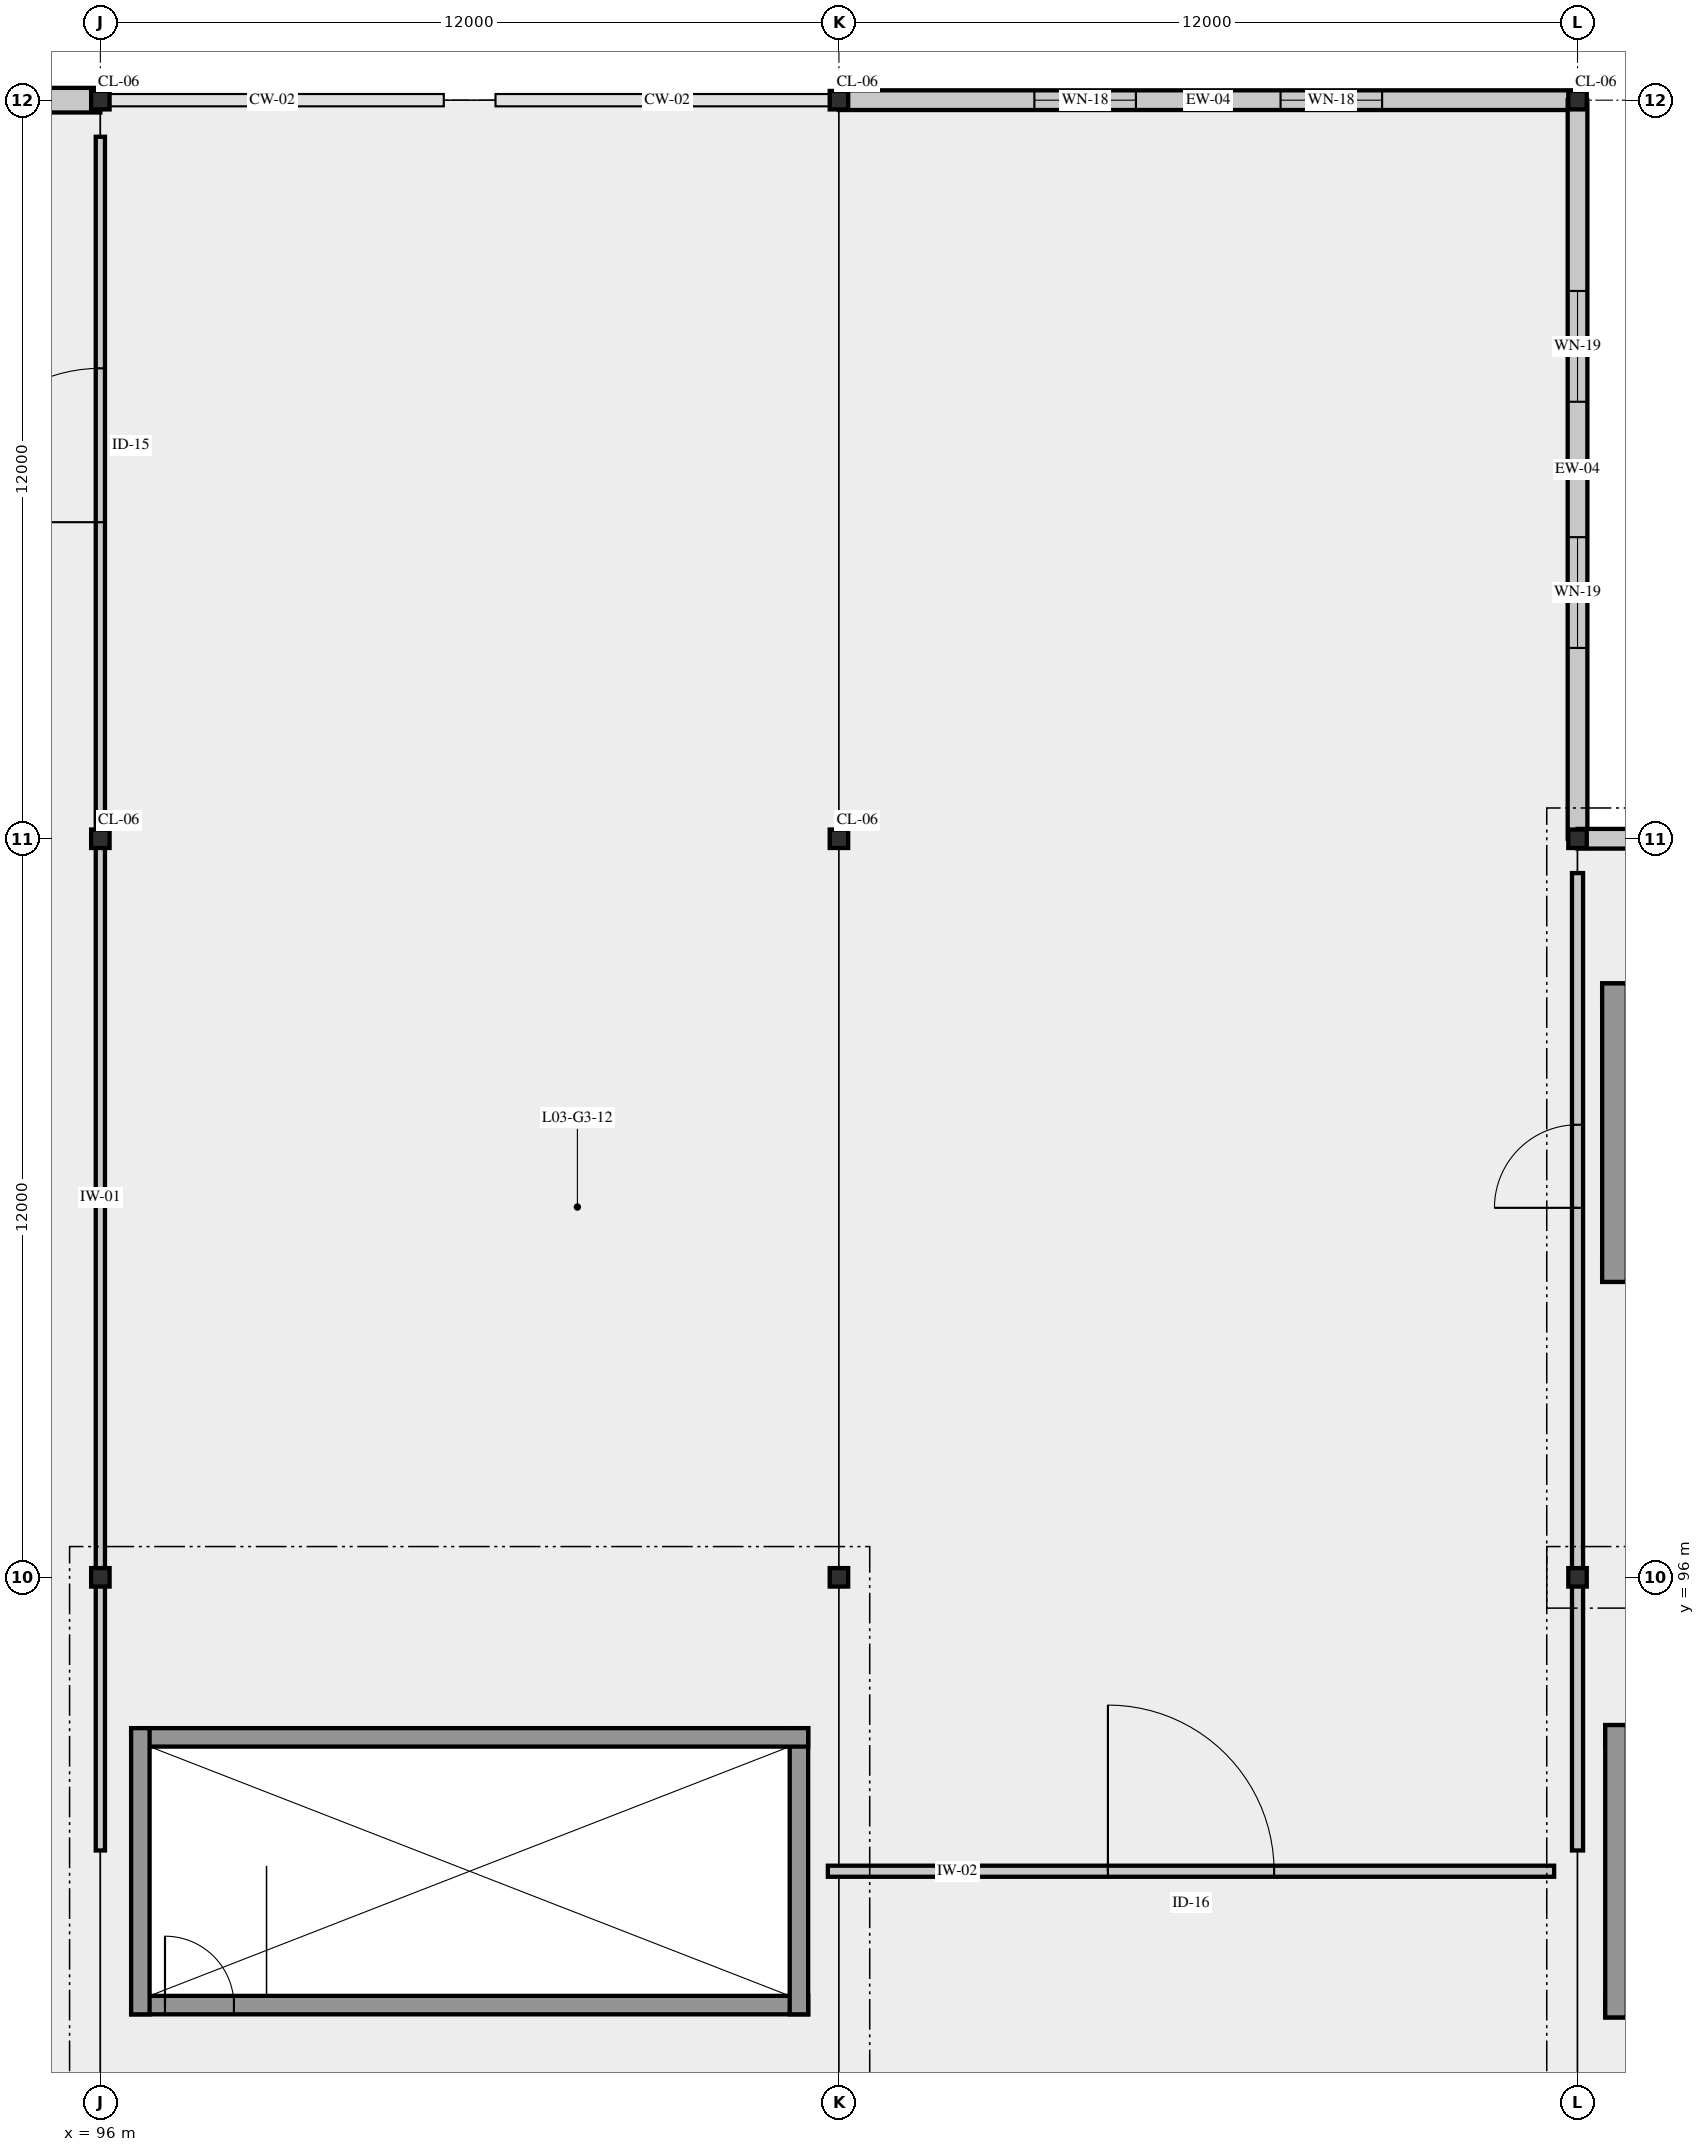
"""IFC4 building model, lengths in metres.
Left out: names, types, materials, properties, quantities, classifications, styles, units other than length and angle.
Written with IfcOpenShell. Run it as: python <this file> out.ifc"""

import sys

from ifc_helpers import new_model, si_unit, direction, frame, frame_2d, origin, origin_2d, place, context, subcontext, project, spatial, rectangle, i_section, extrude, element, fill, save


model = new_model("IFC4")
c1 = context("Model", 3, precision=1e-05, world=origin(), true_north=direction((0.0, 1.0)))
c2 = subcontext(c1, "Body", "Model", "MODEL_VIEW")
j1 = project(units=[si_unit("LENGTHUNIT", "METRE"), si_unit("PLANEANGLEUNIT", "RADIAN")], contexts=[c1])
p1 = place(None, origin())
s1 = spatial("IfcSite", under=j1, at=p1, CompositionType="ELEMENT")
p2 = place(p1, origin())
s2 = spatial("IfcBuilding", under=s1, at=p2, CompositionType="ELEMENT")
p3 = place(p2, frame((0.0, 0.0, 16.8)))
s3 = spatial("IfcBuildingStorey", under=s2, at=p3, CompositionType="ELEMENT", Elevation=16.8)
for number, where, z_axis, x_axis in (
    (1, (96.0, 96.0, 0.0), (0.0, 0.0, 1.0), (1.0, 0.0, 0.0)),
    (2, (96.0, 108.0, 0.0), (0.0, 0.0, 1.0), (1.0, 0.0, 0.0)),
    (3, (96.0, 120.0, 0.0), (0.0, 0.0, 1.0), (1.0, 0.0, 0.0)),
    (4, (108.0, 96.0, 0.0), (0.0, 0.0, 1.0), (1.0, 0.0, 0.0)),
    (5, (108.0, 108.0, 0.0), (0.0, 0.0, 1.0), (1.0, 0.0, 0.0)),
    (6, (108.0, 120.0, 0.0), (0.0, 0.0, 1.0), (1.0, 0.0, 0.0)),
    (7, (120.0, 96.0, 0.0), (0.0, 0.0, 1.0), (1.0, 0.0, 0.0)),
    (8, (120.0, 108.0, 0.0), (0.0, 0.0, 1.0), (1.0, 0.0, 0.0)),
    (9, (120.0, 120.0, 0.0), (0.0, 0.0, 1.0), (1.0, 0.0, 0.0)),
):
    element("IfcColumn", number, at=place(p3, frame(where, z_axis=z_axis, x_axis=x_axis)), inside=s3, PredefinedType="COLUMN", context=c2, shape_type="SweptSolid", body=[
        extrude(i_section(OverallWidth=0.3, OverallDepth=0.3, WebThickness=0.011, FlangeThickness=0.019, FilletRadius=0.027, at=origin_2d()), origin(), (0.0, 0.0, 1.0), 6.6),
    ])
p4 = place(p3, frame((96.0, 120.0, 0.0), z_axis=(0.0, 0.0, 1.0), x_axis=(-1.0, 0.0, 0.0)))
e10 = element("IfcWall", 10, at=p4, inside=s3, PredefinedType="SOLIDWALL", context=c2, shape_type="SweptSolid", body=[
    extrude(rectangle(XDim=12.0, YDim=0.4, at=frame_2d((6.0, 0.0))), origin(), (0.0, 0.0, 1.0), 5.75),
])
p5 = place(p4, frame((3.325, 0.0, 0.95)))
e11 = element("IfcOpeningElement", 11, at=p5, cuts=e10, PredefinedType="OPENING", context=c2, shape_type="SweptSolid", body=[
    extrude(rectangle(XDim=1.35, YDim=1.8, at=frame_2d((0.675, 0.9))), frame((0.0, 0.21, 0.0), z_axis=(0.0, -1.0, 0.0), x_axis=(1.0, 0.0, 0.0)), (0.0, 0.0, 1.0), 0.42),
])
p6 = place(p4, frame((7.325, 0.0, 0.95)))
e12 = element("IfcOpeningElement", 12, at=p6, cuts=e10, PredefinedType="OPENING", context=c2, shape_type="SweptSolid", body=[
    extrude(rectangle(XDim=1.35, YDim=1.8, at=frame_2d((0.675, 0.9))), frame((0.0, 0.21, 0.0), z_axis=(0.0, -1.0, 0.0), x_axis=(1.0, 0.0, 0.0)), (0.0, 0.0, 1.0), 0.42),
])
p7 = place(p3, frame((120.0, 120.0, 0.0), z_axis=(0.0, 0.0, 1.0), x_axis=(-1.0, 0.0, 0.0)))
e13 = element("IfcWall", 13, at=p7, inside=s3, PredefinedType="SOLIDWALL", context=c2, shape_type="SweptSolid", body=[
    extrude(rectangle(XDim=12.0, YDim=0.32, at=frame_2d((6.0, 0.0))), origin(), (0.0, 0.0, 1.0), 5.75),
])
p8 = place(p7, frame((3.175, 0.0, 0.95)))
e14 = element("IfcOpeningElement", 14, at=p8, cuts=e13, PredefinedType="OPENING", context=c2, shape_type="SweptSolid", body=[
    extrude(rectangle(XDim=1.65, YDim=1.8, at=frame_2d((0.825, 0.9))), frame((0.0, 0.17, 0.0), z_axis=(0.0, -1.0, 0.0), x_axis=(1.0, 0.0, 0.0)), (0.0, 0.0, 1.0), 0.34),
])
p9 = place(p7, frame((7.175, 0.0, 0.95)))
e15 = element("IfcOpeningElement", 15, at=p9, cuts=e13, PredefinedType="OPENING", context=c2, shape_type="SweptSolid", body=[
    extrude(rectangle(XDim=1.65, YDim=1.8, at=frame_2d((0.825, 0.9))), frame((0.0, 0.17, 0.0), z_axis=(0.0, -1.0, 0.0), x_axis=(1.0, 0.0, 0.0)), (0.0, 0.0, 1.0), 0.34),
])
p10 = place(p3, frame((120.0, 108.0, 0.0), z_axis=(0.0, 0.0, 1.0), x_axis=(0.0, 1.0, 0.0)))
e16 = element("IfcWall", 16, at=p10, inside=s3, PredefinedType="SOLIDWALL", context=c2, shape_type="SweptSolid", body=[
    extrude(rectangle(XDim=12.0, YDim=0.32, at=frame_2d((6.0, 0.0))), origin(), (0.0, 0.0, 1.0), 5.75),
])
p11 = place(p10, frame((3.1, 0.0, 0.95)))
e17 = element("IfcOpeningElement", 17, at=p11, cuts=e16, PredefinedType="OPENING", context=c2, shape_type="SweptSolid", body=[
    extrude(rectangle(XDim=1.8, YDim=1.8, at=frame_2d((0.9, 0.9))), frame((0.0, 0.17, 0.0), z_axis=(0.0, -1.0, 0.0), x_axis=(1.0, 0.0, 0.0)), (0.0, 0.0, 1.0), 0.34),
])
p12 = place(p10, frame((7.1, 0.0, 0.95)))
e18 = element("IfcOpeningElement", 18, at=p12, cuts=e16, PredefinedType="OPENING", context=c2, shape_type="SweptSolid", body=[
    extrude(rectangle(XDim=1.8, YDim=1.8, at=frame_2d((0.9, 0.9))), frame((0.0, 0.17, 0.0), z_axis=(0.0, -1.0, 0.0), x_axis=(1.0, 0.0, 0.0)), (0.0, 0.0, 1.0), 0.34),
])
p13 = place(p3, frame((132.0, 108.0, 0.0), z_axis=(0.0, 0.0, 1.0), x_axis=(-1.0, 0.0, 0.0)))
e19 = element("IfcWall", 19, at=p13, inside=s3, PredefinedType="SOLIDWALL", context=c2, shape_type="SweptSolid", body=[
    extrude(rectangle(XDim=12.0, YDim=0.32, at=frame_2d((6.0, 0.0))), origin(), (0.0, 0.0, 1.0), 5.75),
])
p14 = place(p13, frame((4.35, 0.0, 0.95)))
e20 = element("IfcOpeningElement", 20, at=p14, cuts=e19, PredefinedType="OPENING", context=c2, shape_type="SweptSolid", body=[
    extrude(rectangle(XDim=3.3, YDim=1.8, at=frame_2d((1.65, 0.9))), frame((0.0, 0.17, 0.0), z_axis=(0.0, -1.0, 0.0), x_axis=(1.0, 0.0, 0.0)), (0.0, 0.0, 1.0), 0.34),
])
p15 = place(p3, frame((96.5, 89.05, 0.0), z_axis=(0.0, 0.0, 1.0), x_axis=(1.0, 0.0, 0.0)))
e21 = element("IfcWall", 21, at=p15, inside=s3, PredefinedType="SHEAR", context=c2, shape_type="SweptSolid", body=[
    extrude(rectangle(XDim=11.0, YDim=0.3, at=frame_2d((5.5, 0.0))), origin(), (0.0, 0.0, 1.0), 6.35),
])
p16 = place(p15, frame((0.55, 0.0, 0.0)))
e22 = element("IfcOpeningElement", 22, at=p16, cuts=e21, PredefinedType="OPENING", context=c2, shape_type="SweptSolid", body=[
    extrude(rectangle(XDim=1.12, YDim=2.2, at=frame_2d((0.56, 1.1))), frame((0.0, 0.16, 0.0), z_axis=(0.0, -1.0, 0.0), x_axis=(1.0, 0.0, 0.0)), (0.0, 0.0, 1.0), 0.32),
])
p17 = place(p3, frame((107.35, 88.9, 0.0), z_axis=(0.0, 0.0, 1.0), x_axis=(0.0, 1.0, 0.0)))
e23 = element("IfcWall", 23, at=p17, inside=s3, PredefinedType="SHEAR", context=c2, shape_type="SweptSolid", body=[
    extrude(rectangle(XDim=4.65, YDim=0.3, at=frame_2d((2.325, 0.0))), origin(), (0.0, 0.0, 1.0), 6.35),
])
p18 = place(p3, frame((107.5, 93.4, 0.0), z_axis=(0.0, 0.0, 1.0), x_axis=(-1.0, 0.0, 0.0)))
e24 = element("IfcWall", 24, at=p18, inside=s3, PredefinedType="SHEAR", context=c2, shape_type="SweptSolid", body=[
    extrude(rectangle(XDim=11.0, YDim=0.3, at=frame_2d((5.5, 0.0))), origin(), (0.0, 0.0, 1.0), 6.35),
])
p19 = place(p3, frame((96.65, 93.55, 0.0), z_axis=(0.0, 0.0, 1.0), x_axis=(0.0, -1.0, 0.0)))
e25 = element("IfcWall", 25, at=p19, inside=s3, PredefinedType="SHEAR", context=c2, shape_type="SweptSolid", body=[
    extrude(rectangle(XDim=4.65, YDim=0.3, at=frame_2d((2.325, 0.0))), origin(), (0.0, 0.0, 1.0), 6.35),
])
p20 = place(p3, frame((120.45, 89.025, 0.0), z_axis=(0.0, 0.0, 1.0), x_axis=(1.0, 0.0, 0.0)))
e26 = element("IfcWall", 26, at=p20, inside=s3, PredefinedType="SHEAR", context=c2, shape_type="SweptSolid", body=[
    extrude(rectangle(XDim=11.1, YDim=0.35, at=frame_2d((5.55, 0.0))), origin(), (0.0, 0.0, 1.0), 6.35),
])
p21 = place(p20, frame((0.55, 0.0, 0.0)))
e27 = element("IfcOpeningElement", 27, at=p21, cuts=e26, PredefinedType="OPENING", context=c2, shape_type="SweptSolid", body=[
    extrude(rectangle(XDim=1.24, YDim=2.25, at=frame_2d((0.62, 1.125))), frame((0.0, 0.185, 0.0), z_axis=(0.0, -1.0, 0.0), x_axis=(1.0, 0.0, 0.0)), (0.0, 0.0, 1.0), 0.37),
])
p22 = place(p3, frame((131.55, 93.425, 0.0), z_axis=(0.0, 0.0, 1.0), x_axis=(-1.0, 0.0, 0.0)))
e28 = element("IfcWall", 28, at=p22, inside=s3, PredefinedType="SHEAR", context=c2, shape_type="SweptSolid", body=[
    extrude(rectangle(XDim=11.1, YDim=0.35, at=frame_2d((5.55, 0.0))), origin(), (0.0, 0.0, 1.0), 6.35),
])
p23 = place(p3, frame((120.625, 93.6, 0.0), z_axis=(0.0, 0.0, 1.0), x_axis=(0.0, -1.0, 0.0)))
e29 = element("IfcWall", 29, at=p23, inside=s3, PredefinedType="SHEAR", context=c2, shape_type="SweptSolid", body=[
    extrude(rectangle(XDim=4.75, YDim=0.35, at=frame_2d((2.375, 0.0))), origin(), (0.0, 0.0, 1.0), 6.35),
])
p24 = place(p3, frame((120.4, 101.0, 0.0), z_axis=(0.0, 0.0, 1.0), x_axis=(1.0, 0.0, 0.0)))
e30 = element("IfcWall", 30, at=p24, inside=s3, PredefinedType="SHEAR", context=c2, shape_type="SweptSolid", body=[
    extrude(rectangle(XDim=11.2, YDim=0.4, at=frame_2d((5.6, 0.0))), origin(), (0.0, 0.0, 1.0), 6.35),
])
p25 = place(p24, frame((0.55, 0.0, 0.0)))
e31 = element("IfcOpeningElement", 31, at=p25, cuts=e30, PredefinedType="OPENING", context=c2, shape_type="SweptSolid", body=[
    extrude(rectangle(XDim=1.48, YDim=2.3, at=frame_2d((0.74, 1.15))), frame((0.0, 0.21, 0.0), z_axis=(0.0, -1.0, 0.0), x_axis=(1.0, 0.0, 0.0)), (0.0, 0.0, 1.0), 0.42),
])
p26 = place(p3, frame((131.6, 105.45, 0.0), z_axis=(0.0, 0.0, 1.0), x_axis=(-1.0, 0.0, 0.0)))
e32 = element("IfcWall", 32, at=p26, inside=s3, PredefinedType="SHEAR", context=c2, shape_type="SweptSolid", body=[
    extrude(rectangle(XDim=11.2, YDim=0.4, at=frame_2d((5.6, 0.0))), origin(), (0.0, 0.0, 1.0), 6.35),
])
p27 = place(p3, frame((120.6, 105.65, 0.0), z_axis=(0.0, 0.0, 1.0), x_axis=(0.0, -1.0, 0.0)))
e33 = element("IfcWall", 33, at=p27, inside=s3, PredefinedType="SHEAR", context=c2, shape_type="SweptSolid", body=[
    extrude(rectangle(XDim=4.85, YDim=0.4, at=frame_2d((2.425, 0.0))), origin(), (0.0, 0.0, 1.0), 6.35),
])
p28 = place(p3, frame((96.0, 91.562, 0.0), z_axis=(0.0, 0.0, 1.0), x_axis=(0.0, 1.0, 0.0)))
e34 = element("IfcWall", 34, at=p28, inside=s3, PredefinedType="PARTITIONING", context=c2, shape_type="SweptSolid", body=[
    extrude(rectangle(XDim=27.843, YDim=0.15, at=frame_2d((13.921, 0.0))), origin(), (0.0, 0.0, 1.0), 5.82),
])
p29 = place(p28, frame((21.581, 0.0, 0.0)))
e35 = element("IfcOpeningElement", 35, at=p29, cuts=e34, PredefinedType="OPENING", context=c2, shape_type="SweptSolid", body=[
    extrude(rectangle(XDim=2.5, YDim=2.75, at=frame_2d((1.25, 1.375))), frame((0.0, 0.085, 0.0), z_axis=(0.0, -1.0, 0.0), x_axis=(1.0, 0.0, 0.0)), (0.0, 0.0, 1.0), 0.17),
])
p30 = place(p3, frame((107.82, 91.225, 0.0), z_axis=(0.0, 0.0, 1.0), x_axis=(1.0, 0.0, 0.0)))
e36 = element("IfcWall", 36, at=p30, inside=s3, PredefinedType="PARTITIONING", context=c2, shape_type="SweptSolid", body=[
    extrude(rectangle(XDim=11.8, YDim=0.18, at=frame_2d((5.9, 0.0))), origin(), (0.0, 0.0, 1.0), 5.82),
])
p31 = place(p30, frame((4.55, 0.0, 0.0)))
e37 = element("IfcOpeningElement", 37, at=p31, cuts=e36, PredefinedType="OPENING", context=c2, shape_type="SweptSolid", body=[
    extrude(rectangle(XDim=2.7, YDim=2.85, at=frame_2d((1.35, 1.425))), frame((0.0, 0.1, 0.0), z_axis=(0.0, -1.0, 0.0), x_axis=(1.0, 0.0, 0.0)), (0.0, 0.0, 1.0), 0.2),
])
p32 = place(p3, frame((120.0, 91.562, 0.0), z_axis=(0.0, 0.0, 1.0), x_axis=(0.0, 1.0, 0.0)))
e38 = element("IfcWall", 38, at=p32, inside=s3, PredefinedType="PARTITIONING", context=c2, shape_type="SweptSolid", body=[
    extrude(rectangle(XDim=15.88, YDim=0.18, at=frame_2d((7.94, 0.0))), origin(), (0.0, 0.0, 1.0), 5.87),
])
p33 = place(p32, frame((10.441, 0.0, 0.0)))
e39 = element("IfcOpeningElement", 39, at=p33, cuts=e38, PredefinedType="OPENING", context=c2, shape_type="SweptSolid", body=[
    extrude(rectangle(XDim=1.35, YDim=2.3, at=frame_2d((0.675, 1.15))), frame((0.0, 0.1, 0.0), z_axis=(0.0, -1.0, 0.0), x_axis=(1.0, 0.0, 0.0)), (0.0, 0.0, 1.0), 0.2),
])
p34 = place(p8, origin())
e40 = element("IfcWindow", 40, at=p34, inside=s3, PartitioningType="SINGLE_PANEL", PredefinedType="WINDOW", context=c2, shape_type="SweptSolid", body=[
    extrude(rectangle(XDim=1.65, YDim=1.8, at=frame_2d((0.825, 0.9))), frame((0.0, 0.03, 0.0), z_axis=(0.0, -1.0, 0.0), x_axis=(1.0, 0.0, 0.0)), (0.0, 0.0, 1.0), 0.06),
])
fill(e14, e40)
p35 = place(p9, origin())
e41 = element("IfcWindow", 41, at=p35, inside=s3, PartitioningType="SINGLE_PANEL", PredefinedType="WINDOW", context=c2, shape_type="SweptSolid", body=[
    extrude(rectangle(XDim=1.65, YDim=1.8, at=frame_2d((0.825, 0.9))), frame((0.0, 0.03, 0.0), z_axis=(0.0, -1.0, 0.0), x_axis=(1.0, 0.0, 0.0)), (0.0, 0.0, 1.0), 0.06),
])
fill(e15, e41)
p36 = place(p11, origin())
e42 = element("IfcWindow", 42, at=p36, inside=s3, PartitioningType="SINGLE_PANEL", PredefinedType="WINDOW", context=c2, shape_type="SweptSolid", body=[
    extrude(rectangle(XDim=1.8, YDim=1.8, at=frame_2d((0.9, 0.9))), frame((0.0, 0.03, 0.0), z_axis=(0.0, -1.0, 0.0), x_axis=(1.0, 0.0, 0.0)), (0.0, 0.0, 1.0), 0.06),
])
fill(e17, e42)
p37 = place(p12, origin())
e43 = element("IfcWindow", 43, at=p37, inside=s3, PartitioningType="SINGLE_PANEL", PredefinedType="WINDOW", context=c2, shape_type="SweptSolid", body=[
    extrude(rectangle(XDim=1.8, YDim=1.8, at=frame_2d((0.9, 0.9))), frame((0.0, 0.03, 0.0), z_axis=(0.0, -1.0, 0.0), x_axis=(1.0, 0.0, 0.0)), (0.0, 0.0, 1.0), 0.06),
])
fill(e18, e43)
p38 = place(p16, origin())
e44 = element("IfcDoor", 44, at=p38, inside=s3, OperationType="SINGLE_SWING_LEFT", PredefinedType="DOOR", context=c2, shape_type="SweptSolid", body=[
    extrude(rectangle(XDim=1.12, YDim=2.2, at=frame_2d((0.56, 1.1))), frame((0.0, 0.025, 0.0), z_axis=(0.0, -1.0, 0.0), x_axis=(1.0, 0.0, 0.0)), (0.0, 0.0, 1.0), 0.05),
])
fill(e22, e44)
p39 = place(p29, origin())
e45 = element("IfcDoor", 45, at=p39, inside=s3, OperationType="DOUBLE_DOOR_SINGLE_SWING", PredefinedType="DOOR", context=c2, shape_type="SweptSolid", body=[
    extrude(rectangle(XDim=2.5, YDim=2.75, at=frame_2d((1.25, 1.375))), frame((0.0, 0.025, 0.0), z_axis=(0.0, -1.0, 0.0), x_axis=(1.0, 0.0, 0.0)), (0.0, 0.0, 1.0), 0.05),
])
fill(e35, e45)
p40 = place(p31, origin())
e46 = element("IfcDoor", 46, at=p40, inside=s3, OperationType="DOUBLE_DOOR_SINGLE_SWING", PredefinedType="DOOR", context=c2, shape_type="SweptSolid", body=[
    extrude(rectangle(XDim=2.7, YDim=2.85, at=frame_2d((1.35, 1.425))), frame((0.0, 0.025, 0.0), z_axis=(0.0, -1.0, 0.0), x_axis=(1.0, 0.0, 0.0)), (0.0, 0.0, 1.0), 0.05),
])
fill(e37, e46)
p41 = place(p33, origin())
e47 = element("IfcDoor", 47, at=p41, inside=s3, OperationType="DOUBLE_SWING_LEFT", PredefinedType="DOOR", context=c2, shape_type="SweptSolid", body=[
    extrude(rectangle(XDim=1.35, YDim=2.3, at=frame_2d((0.675, 1.15))), frame((0.0, 0.025, 0.0), z_axis=(0.0, -1.0, 0.0), x_axis=(1.0, 0.0, 0.0)), (0.0, 0.0, 1.0), 0.05),
])
fill(e39, e47)
save(model, sys.argv[1])
